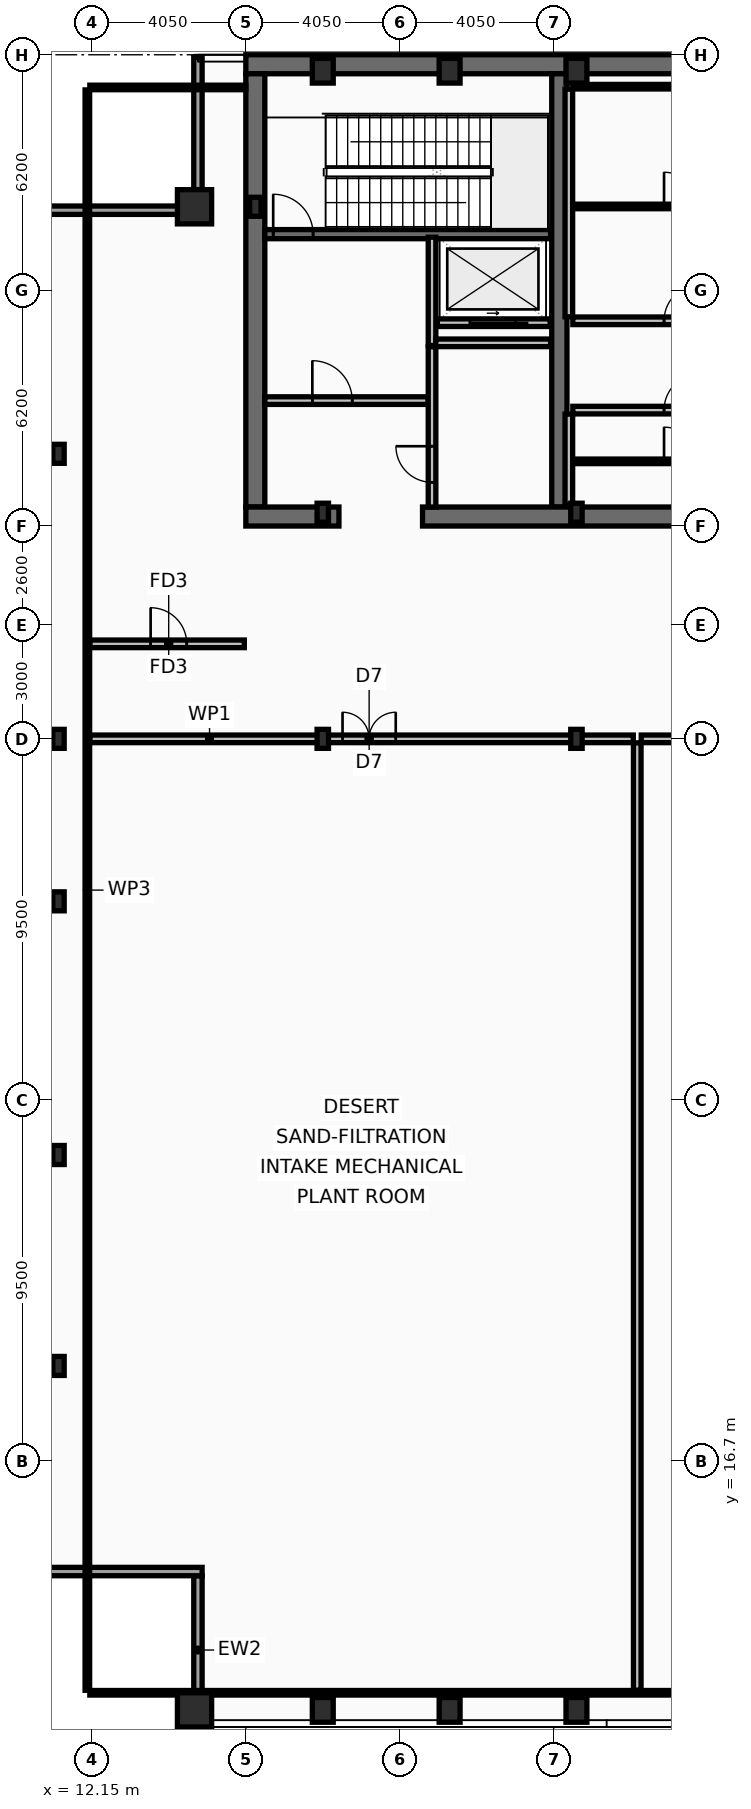
"""IFC4 building model, lengths in metres.
Left out: names, types, materials, properties, quantities, classifications, styles, units other than length and angle.
Written with IfcOpenShell. Run it as: python <this file> out.ifc"""

import sys

from ifc_helpers import new_model, si_unit, direction, frame, frame_2d, origin, origin_2d, place, context, subcontext, project, spatial, rectangle, hollow_rectangle, i_section, extrude, element, fill, save


model = new_model("IFC4")
c1 = context("Model", 3, precision=1e-05, world=origin(), true_north=direction((0.0, 1.0)))
c2 = subcontext(c1, "Body", "Model", "MODEL_VIEW")
j1 = project(units=[si_unit("LENGTHUNIT", "METRE"), si_unit("PLANEANGLEUNIT", "RADIAN")], contexts=[c1])
p1 = place(None, origin())
s1 = spatial("IfcSite", under=j1, at=p1, CompositionType="ELEMENT")
p2 = place(p1, origin())
s2 = spatial("IfcBuilding", under=s1, at=p2, CompositionType="ELEMENT")
p3 = place(p2, frame((0.0, 0.0, 373.0)))
s3 = spatial("IfcBuildingStorey", under=s2, at=p3, CompositionType="ELEMENT", Elevation=373.0)
p4 = place(p3, frame((16.2, 53.45, 0.0), z_axis=(0.0, 0.0, 1.0), x_axis=(1.0, 0.0, 0.0)))
e1 = element("IfcWall", 1, at=p4, inside=s3, PredefinedType="SHEAR", context=c2, shape_type="SweptSolid", body=[
    extrude(rectangle(XDim=40.5, YDim=0.5, at=frame_2d((20.25, 0.0))), origin(), (0.0, 0.0, 1.0), 5.4),
])
p5 = place(p3, frame((16.45, 41.8, 0.0), z_axis=(0.0, 0.0, 1.0), x_axis=(0.0, 1.0, 0.0)))
e2 = element("IfcWall", 2, at=p5, inside=s3, PredefinedType="SHEAR", context=c2, shape_type="SweptSolid", body=[
    extrude(rectangle(XDim=11.4, YDim=0.5, at=frame_2d((5.7, 0.0))), origin(), (0.0, 0.0, 1.0), 5.4),
])
p6 = place(p3, frame((24.45, 41.8, 0.0), z_axis=(0.0, 0.0, 1.0), x_axis=(0.0, 1.0, 0.0)))
e3 = element("IfcWall", 3, at=p6, inside=s3, PredefinedType="SHEAR", context=c2, shape_type="SweptSolid", body=[
    extrude(rectangle(XDim=11.4, YDim=0.4, at=frame_2d((5.7, 0.0))), origin(), (0.0, 0.0, 1.0), 5.4),
])
p7 = place(p3, frame((18.65, 41.55, 0.0), z_axis=(0.0, 0.0, 1.0), x_axis=(-1.0, 0.0, 0.0)))
e4 = element("IfcWall", 4, at=p7, inside=s3, PredefinedType="SHEAR", context=c2, shape_type="SweptSolid", body=[
    extrude(rectangle(XDim=2.45, YDim=0.5, at=frame_2d((1.225, 0.0))), origin(), (0.0, 0.0, 1.0), 5.4),
])
p8 = place(p3, frame((32.3, 41.55, 0.0), z_axis=(0.0, 0.0, 1.0), x_axis=(-1.0, 0.0, 0.0)))
e5 = element("IfcWall", 5, at=p8, inside=s3, PredefinedType="SHEAR", context=c2, shape_type="SweptSolid", body=[
    extrude(rectangle(XDim=11.45, YDim=0.5, at=frame_2d((5.725, 0.0))), origin(), (0.0, 0.0, 1.0), 5.4),
])
p9 = place(p3, frame((16.7, 48.98, 0.0), z_axis=(0.0, 0.0, 1.0), x_axis=(1.0, 0.0, 0.0)))
e6 = element("IfcWall", 6, at=p9, inside=s3, PredefinedType="SHEAR", context=c2, shape_type="SweptSolid", body=[
    extrude(rectangle(XDim=7.52, YDim=0.24, at=frame_2d((3.76, 0.0))), origin(), (0.0, 0.0, 1.0), 5.4),
])
p10 = place(p9, frame((0.22, 0.0, 0.0)))
e7 = element("IfcOpeningElement", 7, at=p10, cuts=e6, PredefinedType="OPENING", context=c2, shape_type="SweptSolid", body=[
    extrude(rectangle(XDim=1.05, YDim=2.15, at=frame_2d((0.525, 1.075))), frame((0.0, 0.13, 0.0), z_axis=(0.0, -1.0, 0.0), x_axis=(1.0, 0.0, 0.0)), (0.0, 0.0, 1.0), 0.26),
])
for number, where, z_axis, x_axis in (
    (8, (14.85, 10.15, 0.0), (0.0, 0.0, 1.0), (1.0, 0.0, 0.0)),
    (9, (14.85, 49.7, 0.0), (0.0, 0.0, 1.0), (1.0, 0.0, 0.0)),
):
    element("IfcColumn", number, at=place(p3, frame(where, z_axis=z_axis, x_axis=x_axis)), inside=s3, PredefinedType="COLUMN", context=c2, shape_type="SweptSolid", body=[
        extrude(hollow_rectangle(XDim=0.9, YDim=0.9, WallThickness=0.05, at=origin_2d()), origin(), (0.0, 0.0, 1.0), 5.6),
    ])
for number, where, z_axis, x_axis in (
    (10, (18.225, 10.15, 0.0), (0.0, 0.0, 1.0), (1.0, 0.0, 0.0)),
    (11, (21.562, 10.15, 0.0), (0.0, 0.0, 1.0), (1.0, 0.0, 0.0)),
    (12, (24.9, 10.15, 0.0), (0.0, 0.0, 1.0), (1.0, 0.0, 0.0)),
    (13, (18.225, 53.28, 0.0), (0.0, 0.0, 1.0), (1.0, 0.0, 0.0)),
    (14, (21.562, 53.28, 0.0), (0.0, 0.0, 1.0), (1.0, 0.0, 0.0)),
    (15, (24.9, 53.28, 0.0), (0.0, 0.0, 1.0), (1.0, 0.0, 0.0)),
):
    element("IfcColumn", number, at=place(p3, frame(where, z_axis=z_axis, x_axis=x_axis)), inside=s3, PredefinedType="COLUMN", context=c2, shape_type="SweptSolid", body=[
        extrude(hollow_rectangle(XDim=0.55, YDim=0.65, WallThickness=0.04, at=origin_2d()), origin(), (0.0, 0.0, 1.0), 5.6),
    ])
for number, where, z_axis, x_axis in (
    (16, (11.27, 19.2, 0.0), (0.0, 0.0, 1.0), (1.0, 0.0, 0.0)),
    (17, (11.27, 24.75, 0.0), (0.0, 0.0, 1.0), (1.0, 0.0, 0.0)),
    (18, (11.27, 31.425, 0.0), (0.0, 0.0, 1.0), (1.0, 0.0, 0.0)),
    (19, (11.27, 35.7, 0.0), (0.0, 0.0, 1.0), (1.0, 0.0, 0.0)),
    (20, (11.27, 43.2, 0.0), (0.0, 0.0, 1.0), (1.0, 0.0, 0.0)),
    (21, (16.45, 49.7, 0.0), (0.0, 0.0, 1.0), (1.0, 0.0, 0.0)),
    (22, (18.225, 35.7, 0.0), (0.0, 0.0, 1.0), (1.0, 0.0, 0.0)),
    (23, (18.225, 41.65, 0.0), (0.0, 0.0, 1.0), (1.0, 0.0, 0.0)),
    (24, (24.9, 35.7, 0.0), (0.0, 0.0, 1.0), (1.0, 0.0, 0.0)),
    (25, (24.9, 41.65, 0.0), (0.0, 0.0, 1.0), (1.0, 0.0, 0.0)),
):
    element("IfcColumn", number, at=place(p3, frame(where, z_axis=z_axis, x_axis=x_axis)), inside=s3, PredefinedType="COLUMN", context=c2, shape_type="SweptSolid", body=[
        extrude(i_section(OverallWidth=0.3, OverallDepth=0.5, WebThickness=0.014, FlangeThickness=0.028, at=origin_2d()), origin(), (0.0, 0.0, 1.0), 5.6),
    ])
p11 = place(p3, frame((14.94, 9.77, 0.0), z_axis=(0.0, 0.0, 1.0), x_axis=(0.0, 1.0, 0.0)))
e26 = element("IfcWall", 26, at=p11, inside=s3, PredefinedType="SOLIDWALL", context=c2, shape_type="SweptSolid", body=[
    extrude(rectangle(XDim=3.91, YDim=0.22, at=frame_2d((1.955, 0.0))), origin(), (0.0, 0.0, 1.0), 4.84),
])
for number, where, z_axis, x_axis in (
    (27, (15.05, 13.79, 0.0), (0.0, 0.0, 1.0), (-1.0, 0.0, 0.0)),
    (28, (10.92, 49.61, 0.0), (0.0, 0.0, 1.0), (1.0, 0.0, 0.0)),
):
    element("IfcWall", number, at=place(p3, frame(where, z_axis=z_axis, x_axis=x_axis)), inside=s3, PredefinedType="SOLIDWALL", context=c2, shape_type="SweptSolid", body=[
        extrude(rectangle(XDim=4.13, YDim=0.22, at=frame_2d((2.065, 0.0))), origin(), (0.0, 0.0, 1.0), 4.84),
    ])
p12 = place(p3, frame((14.94, 49.72, 0.0), z_axis=(0.0, 0.0, 1.0), x_axis=(0.0, 1.0, 0.0)))
e29 = element("IfcWall", 29, at=p12, inside=s3, PredefinedType="SOLIDWALL", context=c2, shape_type="SweptSolid", body=[
    extrude(rectangle(XDim=3.91, YDim=0.22, at=frame_2d((1.955, 0.0))), origin(), (0.0, 0.0, 1.0), 4.84),
])
p13 = place(p3, frame((24.21, 46.65, 0.0), z_axis=(0.0, 0.0, 1.0), x_axis=(-1.0, 0.0, 0.0)))
e30 = element("IfcWall", 30, at=p13, inside=s3, PredefinedType="PARTITIONING", context=c2, shape_type="SweptSolid", body=[
    extrude(rectangle(XDim=2.97, YDim=0.2, at=frame_2d((1.485, 0.0))), origin(), (0.0, 0.0, 1.0), 5.4),
])
p14 = place(p13, frame((0.91, 0.0, 0.0)))
e31 = element("IfcOpeningElement", 31, at=p14, cuts=e30, PredefinedType="OPENING", context=c2, shape_type="SweptSolid", body=[
    extrude(rectangle(XDim=1.2, YDim=2.18, at=frame_2d((0.6, 1.09))), frame((0.0, 0.11, 0.0), z_axis=(0.0, -1.0, 0.0), x_axis=(1.0, 0.0, 0.0)), (0.0, 0.0, 1.0), 0.22),
])
p15 = place(p3, frame((21.1, 46.05, 0.0), z_axis=(0.0, 0.0, 1.0), x_axis=(0.0, 1.0, 0.0)))
e32 = element("IfcWall", 32, at=p15, inside=s3, PredefinedType="PARTITIONING", context=c2, shape_type="SweptSolid", body=[
    extrude(rectangle(XDim=2.85, YDim=0.2, at=frame_2d((1.425, 0.0))), origin(), (0.0, 0.0, 1.0), 5.4),
])
p16 = place(p3, frame((16.7, 44.6, 0.0), z_axis=(0.0, 0.0, 1.0), x_axis=(1.0, 0.0, 0.0)))
e33 = element("IfcWall", 33, at=p16, inside=s3, PredefinedType="PARTITIONING", context=c2, shape_type="SweptSolid", body=[
    extrude(rectangle(XDim=4.3, YDim=0.2, at=frame_2d((2.15, 0.0))), origin(), (0.0, 0.0, 1.0), 5.4),
])
p17 = place(p16, frame((1.25, 0.0, 0.0)))
e34 = element("IfcOpeningElement", 34, at=p17, cuts=e33, PredefinedType="OPENING", context=c2, shape_type="SweptSolid", body=[
    extrude(rectangle(XDim=1.05, YDim=2.15, at=frame_2d((0.525, 1.075))), frame((0.0, 0.11, 0.0), z_axis=(0.0, -1.0, 0.0), x_axis=(1.0, 0.0, 0.0)), (0.0, 0.0, 1.0), 0.22),
])
p18 = place(p3, frame((21.2, 46.12, 0.0), z_axis=(0.0, 0.0, 1.0), x_axis=(1.0, 0.0, 0.0)))
e35 = element("IfcWall", 35, at=p18, inside=s3, PredefinedType="PARTITIONING", context=c2, shape_type="SweptSolid", body=[
    extrude(rectangle(XDim=3.02, YDim=0.2, at=frame_2d((1.51, 0.0))), origin(), (0.0, 0.0, 1.0), 5.4),
])
p19 = place(p3, frame((21.1, 41.8, 0.0), z_axis=(0.0, 0.0, 1.0), x_axis=(0.0, 1.0, 0.0)))
e36 = element("IfcWall", 36, at=p19, inside=s3, PredefinedType="PARTITIONING", context=c2, shape_type="SweptSolid", body=[
    extrude(rectangle(XDim=4.215, YDim=0.2, at=frame_2d((2.107, 0.0))), origin(), (0.0, 0.0, 1.0), 5.4),
])
p20 = place(p19, frame((0.65, 0.0, 0.0)))
e37 = element("IfcOpeningElement", 37, at=p20, cuts=e36, PredefinedType="OPENING", context=c2, shape_type="SweptSolid", body=[
    extrude(rectangle(XDim=0.95, YDim=2.1, at=frame_2d((0.475, 1.05))), frame((0.0, 0.11, 0.0), z_axis=(0.0, -1.0, 0.0), x_axis=(1.0, 0.0, 0.0)), (0.0, 0.0, 1.0), 0.22),
])
p21 = place(p3, frame((24.7, 46.805, 0.0), z_axis=(0.0, 0.0, 1.0), x_axis=(0.0, 1.0, 0.0)))
e38 = element("IfcWall", 38, at=p21, inside=s3, PredefinedType="PARTITIONING", context=c2, shape_type="SweptSolid", body=[
    extrude(rectangle(XDim=5.99, YDim=0.2, at=frame_2d((2.995, 0.0))), origin(), (0.0, 0.0, 1.0), 5.4),
])
p22 = place(p3, frame((24.805, 52.86, 0.0), z_axis=(0.0, 0.0, 1.0), x_axis=(1.0, 0.0, 0.0)))
e39 = element("IfcWall", 39, at=p22, inside=s3, PredefinedType="PARTITIONING", context=c2, shape_type="SweptSolid", body=[
    extrude(rectangle(XDim=7.51, YDim=0.12, at=frame_2d((3.755, 0.0))), origin(), (0.0, 0.0, 1.0), 5.4),
])
p23 = place(p3, frame((24.805, 49.709, 0.0), z_axis=(0.0, 0.0, 1.0), x_axis=(1.0, 0.0, 0.0)))
e40 = element("IfcWall", 40, at=p23, inside=s3, PredefinedType="PARTITIONING", context=c2, shape_type="SweptSolid", body=[
    extrude(rectangle(XDim=7.51, YDim=0.12, at=frame_2d((3.755, 0.0))), origin(), (0.0, 0.0, 1.0), 5.4),
])
p24 = place(p23, frame((2.4, 0.0, 0.0)))
e41 = element("IfcOpeningElement", 41, at=p24, cuts=e40, PredefinedType="OPENING", context=c2, shape_type="SweptSolid", body=[
    extrude(rectangle(XDim=0.9, YDim=2.05, at=frame_2d((0.45, 1.025))), frame((0.0, 0.07, 0.0), z_axis=(0.0, -1.0, 0.0), x_axis=(1.0, 0.0, 0.0)), (0.0, 0.0, 1.0), 0.14),
])
p25 = place(p3, frame((24.805, 46.7, 0.0), z_axis=(0.0, 0.0, 1.0), x_axis=(1.0, 0.0, 0.0)))
e42 = element("IfcWall", 42, at=p25, inside=s3, PredefinedType="PARTITIONING", context=c2, shape_type="SweptSolid", body=[
    extrude(rectangle(XDim=7.51, YDim=0.2, at=frame_2d((3.755, 0.0))), origin(), (0.0, 0.0, 1.0), 5.4),
])
p26 = place(p25, frame((2.4, 0.0, 0.0)))
e43 = element("IfcOpeningElement", 43, at=p26, cuts=e42, PredefinedType="OPENING", context=c2, shape_type="SweptSolid", body=[
    extrude(rectangle(XDim=0.95, YDim=2.1, at=frame_2d((0.475, 1.05))), frame((0.0, 0.11, 0.0), z_axis=(0.0, -1.0, 0.0), x_axis=(1.0, 0.0, 0.0)), (0.0, 0.0, 1.0), 0.22),
])
p27 = place(p3, frame((24.7, 41.85, 0.0), z_axis=(0.0, 0.0, 1.0), x_axis=(0.0, 1.0, 0.0)))
e44 = element("IfcWall", 44, at=p27, inside=s3, PredefinedType="PARTITIONING", context=c2, shape_type="SweptSolid", body=[
    extrude(rectangle(XDim=2.395, YDim=0.2, at=frame_2d((1.198, 0.0))), origin(), (0.0, 0.0, 1.0), 5.4),
])
p28 = place(p3, frame((24.805, 43.002, 0.0), z_axis=(0.0, 0.0, 1.0), x_axis=(1.0, 0.0, 0.0)))
e45 = element("IfcWall", 45, at=p28, inside=s3, PredefinedType="PARTITIONING", context=c2, shape_type="SweptSolid", body=[
    extrude(rectangle(XDim=7.34, YDim=0.12, at=frame_2d((3.67, 0.0))), origin(), (0.0, 0.0, 1.0), 5.4),
])
p29 = place(p28, frame((2.4, 0.0, 0.0)))
e46 = element("IfcOpeningElement", 46, at=p29, cuts=e45, PredefinedType="OPENING", context=c2, shape_type="SweptSolid", body=[
    extrude(rectangle(XDim=0.9, YDim=2.05, at=frame_2d((0.45, 1.025))), frame((0.0, 0.07, 0.0), z_axis=(0.0, -1.0, 0.0), x_axis=(1.0, 0.0, 0.0)), (0.0, 0.0, 1.0), 0.14),
])
p30 = place(p3, frame((24.805, 44.35, 0.0), z_axis=(0.0, 0.0, 1.0), x_axis=(1.0, 0.0, 0.0)))
e47 = element("IfcWall", 47, at=p30, inside=s3, PredefinedType="PARTITIONING", context=c2, shape_type="SweptSolid", body=[
    extrude(rectangle(XDim=7.34, YDim=0.2, at=frame_2d((3.67, 0.0))), origin(), (0.0, 0.0, 1.0), 5.4),
])
p31 = place(p30, frame((2.4, 0.0, 0.0)))
e48 = element("IfcOpeningElement", 48, at=p31, cuts=e47, PredefinedType="OPENING", context=c2, shape_type="SweptSolid", body=[
    extrude(rectangle(XDim=0.95, YDim=2.1, at=frame_2d((0.475, 1.05))), frame((0.0, 0.11, 0.0), z_axis=(0.0, -1.0, 0.0), x_axis=(1.0, 0.0, 0.0)), (0.0, 0.0, 1.0), 0.22),
])
p32 = place(p3, frame((12.095, 35.7, 0.0), z_axis=(0.0, 0.0, 1.0), x_axis=(1.0, 0.0, 0.0)))
e49 = element("IfcWall", 49, at=p32, inside=s3, PredefinedType="PARTITIONING", context=c2, shape_type="SweptSolid", body=[
    extrude(rectangle(XDim=14.3, YDim=0.2, at=frame_2d((7.15, 0.0))), origin(), (0.0, 0.0, 1.0), 4.79),
])
p33 = place(p32, frame((6.65, 0.0, 0.0)))
e50 = element("IfcOpeningElement", 50, at=p33, cuts=e49, PredefinedType="OPENING", context=c2, shape_type="SweptSolid", body=[
    extrude(rectangle(XDim=1.4, YDim=2.15, at=frame_2d((0.7, 1.075))), frame((0.0, 0.11, 0.0), z_axis=(0.0, -1.0, 0.0), x_axis=(1.0, 0.0, 0.0)), (0.0, 0.0, 1.0), 0.22),
])
p34 = place(p3, frame((26.605, 35.7, 0.0), z_axis=(0.0, 0.0, 1.0), x_axis=(1.0, 0.0, 0.0)))
e51 = element("IfcWall", 51, at=p34, inside=s3, PredefinedType="PARTITIONING", context=c2, shape_type="SweptSolid", body=[
    extrude(rectangle(XDim=19.69, YDim=0.2, at=frame_2d((9.845, 0.0))), origin(), (0.0, 0.0, 1.0), 5.03),
])
p35 = place(p34, frame((8.5, 0.0, 0.0)))
e52 = element("IfcOpeningElement", 52, at=p35, cuts=e51, PredefinedType="OPENING", context=c2, shape_type="SweptSolid", body=[
    extrude(rectangle(XDim=1.4, YDim=2.15, at=frame_2d((0.7, 1.075))), frame((0.0, 0.11, 0.0), z_axis=(0.0, -1.0, 0.0), x_axis=(1.0, 0.0, 0.0)), (0.0, 0.0, 1.0), 0.22),
])
p36 = place(p3, frame((26.5, 10.665, 0.0), z_axis=(0.0, 0.0, 1.0), x_axis=(0.0, 1.0, 0.0)))
e53 = element("IfcWall", 53, at=p36, inside=s3, PredefinedType="PARTITIONING", context=c2, shape_type="SweptSolid", body=[
    extrude(rectangle(XDim=24.93, YDim=0.2, at=frame_2d((12.465, 0.0))), origin(), (0.0, 0.0, 1.0), 5.03),
])
p37 = place(p3, frame((12.095, 38.2, 0.0), z_axis=(0.0, 0.0, 1.0), x_axis=(1.0, 0.0, 0.0)))
e54 = element("IfcWall", 54, at=p37, inside=s3, PredefinedType="PARTITIONING", context=c2, shape_type="SweptSolid", body=[
    extrude(rectangle(XDim=4.065, YDim=0.2, at=frame_2d((2.032, 0.0))), origin(), (0.0, 0.0, 1.0), 5.4),
])
p38 = place(p37, frame((1.6, 0.0, 0.0)))
e55 = element("IfcOpeningElement", 55, at=p38, cuts=e54, PredefinedType="OPENING", context=c2, shape_type="SweptSolid", body=[
    extrude(rectangle(XDim=0.95, YDim=2.1, at=frame_2d((0.475, 1.05))), frame((0.0, 0.11, 0.0), z_axis=(0.0, -1.0, 0.0), x_axis=(1.0, 0.0, 0.0)), (0.0, 0.0, 1.0), 0.22),
])
p39 = place(p3, frame((12.03, 10.665, 0.0), z_axis=(0.0, 0.0, 1.0), x_axis=(0.0, 1.0, 0.0)))
e56 = element("IfcWall", 56, at=p39, inside=s3, PredefinedType="PARTITIONING", context=c2, shape_type="SweptSolid", body=[
    extrude(rectangle(XDim=42.11, YDim=0.12, at=frame_2d((21.055, 0.0))), origin(), (0.0, 0.0, 1.0), 4.79),
])
p40 = place(p3, frame((12.095, 52.84, 0.0), z_axis=(0.0, 0.0, 1.0), x_axis=(1.0, 0.0, 0.0)))
e57 = element("IfcWall", 57, at=p40, inside=s3, PredefinedType="PARTITIONING", context=c2, shape_type="SweptSolid", body=[
    extrude(rectangle(XDim=4.105, YDim=0.12, at=frame_2d((2.052, 0.0))), origin(), (0.0, 0.0, 1.0), 5.4),
])
p41 = place(p3, frame((12.095, 10.6, 0.0), z_axis=(0.0, 0.0, 1.0), x_axis=(1.0, 0.0, 0.0)))
e58 = element("IfcWall", 58, at=p41, inside=s3, PredefinedType="PARTITIONING", context=c2, shape_type="SweptSolid", body=[
    extrude(rectangle(XDim=48.71, YDim=0.12, at=frame_2d((24.355, 0.0))), origin(), (0.0, 0.0, 1.0), 4.79),
])
p42 = place(p10, origin())
e59 = element("IfcDoor", 59, at=p42, inside=s3, OperationType="SINGLE_SWING_LEFT", PredefinedType="DOOR", context=c2, shape_type="SweptSolid", body=[
    extrude(rectangle(XDim=1.05, YDim=2.15, at=frame_2d((0.525, 1.075))), frame((0.0, 0.025, 0.0), z_axis=(0.0, -1.0, 0.0), x_axis=(1.0, 0.0, 0.0)), (0.0, 0.0, 1.0), 0.05),
])
fill(e7, e59)
p43 = place(p14, origin())
e60 = element("IfcDoor", 60, at=p43, inside=s3, OperationType="SLIDING_TO_LEFT", PredefinedType="DOOR", context=c2, shape_type="SweptSolid", body=[
    extrude(rectangle(XDim=1.2, YDim=2.18, at=frame_2d((0.6, 1.09))), frame((0.0, 0.025, 0.0), z_axis=(0.0, -1.0, 0.0), x_axis=(1.0, 0.0, 0.0)), (0.0, 0.0, 1.0), 0.05),
])
fill(e31, e60)
p44 = place(p17, origin())
e61 = element("IfcDoor", 61, at=p44, inside=s3, OperationType="SINGLE_SWING_LEFT", PredefinedType="DOOR", context=c2, shape_type="SweptSolid", body=[
    extrude(rectangle(XDim=1.05, YDim=2.15, at=frame_2d((0.525, 1.075))), frame((0.0, 0.025, 0.0), z_axis=(0.0, -1.0, 0.0), x_axis=(1.0, 0.0, 0.0)), (0.0, 0.0, 1.0), 0.05),
])
fill(e34, e61)
p45 = place(p20, origin())
e62 = element("IfcDoor", 62, at=p45, inside=s3, OperationType="SINGLE_SWING_RIGHT", PredefinedType="DOOR", context=c2, shape_type="SweptSolid", body=[
    extrude(rectangle(XDim=0.95, YDim=2.1, at=frame_2d((0.475, 1.05))), frame((0.0, 0.025, 0.0), z_axis=(0.0, -1.0, 0.0), x_axis=(1.0, 0.0, 0.0)), (0.0, 0.0, 1.0), 0.05),
])
fill(e37, e62)
p46 = place(p24, origin())
e63 = element("IfcDoor", 63, at=p46, inside=s3, OperationType="SINGLE_SWING_LEFT", PredefinedType="DOOR", context=c2, shape_type="SweptSolid", body=[
    extrude(rectangle(XDim=0.9, YDim=2.05, at=frame_2d((0.45, 1.025))), frame((0.0, 0.025, 0.0), z_axis=(0.0, -1.0, 0.0), x_axis=(1.0, 0.0, 0.0)), (0.0, 0.0, 1.0), 0.05),
])
fill(e41, e63)
p47 = place(p26, origin())
e64 = element("IfcDoor", 64, at=p47, inside=s3, OperationType="SINGLE_SWING_RIGHT", PredefinedType="DOOR", context=c2, shape_type="SweptSolid", body=[
    extrude(rectangle(XDim=0.95, YDim=2.1, at=frame_2d((0.475, 1.05))), frame((0.0, 0.025, 0.0), z_axis=(0.0, -1.0, 0.0), x_axis=(1.0, 0.0, 0.0)), (0.0, 0.0, 1.0), 0.05),
])
fill(e43, e64)
p48 = place(p29, origin())
e65 = element("IfcDoor", 65, at=p48, inside=s3, OperationType="SINGLE_SWING_LEFT", PredefinedType="DOOR", context=c2, shape_type="SweptSolid", body=[
    extrude(rectangle(XDim=0.9, YDim=2.05, at=frame_2d((0.45, 1.025))), frame((0.0, 0.025, 0.0), z_axis=(0.0, -1.0, 0.0), x_axis=(1.0, 0.0, 0.0)), (0.0, 0.0, 1.0), 0.05),
])
fill(e46, e65)
p49 = place(p31, origin())
e66 = element("IfcDoor", 66, at=p49, inside=s3, OperationType="SINGLE_SWING_RIGHT", PredefinedType="DOOR", context=c2, shape_type="SweptSolid", body=[
    extrude(rectangle(XDim=0.95, YDim=2.1, at=frame_2d((0.475, 1.05))), frame((0.0, 0.025, 0.0), z_axis=(0.0, -1.0, 0.0), x_axis=(1.0, 0.0, 0.0)), (0.0, 0.0, 1.0), 0.05),
])
fill(e48, e66)
p50 = place(p33, origin())
e67 = element("IfcDoor", 67, at=p50, inside=s3, OperationType="DOUBLE_DOOR_SINGLE_SWING", PredefinedType="DOOR", context=c2, shape_type="SweptSolid", body=[
    extrude(rectangle(XDim=1.4, YDim=2.15, at=frame_2d((0.7, 1.075))), frame((0.0, 0.025, 0.0), z_axis=(0.0, -1.0, 0.0), x_axis=(1.0, 0.0, 0.0)), (0.0, 0.0, 1.0), 0.05),
])
fill(e50, e67)
p51 = place(p38, origin())
e68 = element("IfcDoor", 68, at=p51, inside=s3, OperationType="SINGLE_SWING_LEFT", PredefinedType="DOOR", context=c2, shape_type="SweptSolid", body=[
    extrude(rectangle(XDim=0.95, YDim=2.1, at=frame_2d((0.475, 1.05))), frame((0.0, 0.025, 0.0), z_axis=(0.0, -1.0, 0.0), x_axis=(1.0, 0.0, 0.0)), (0.0, 0.0, 1.0), 0.05),
])
fill(e55, e68)
save(model, sys.argv[1])
